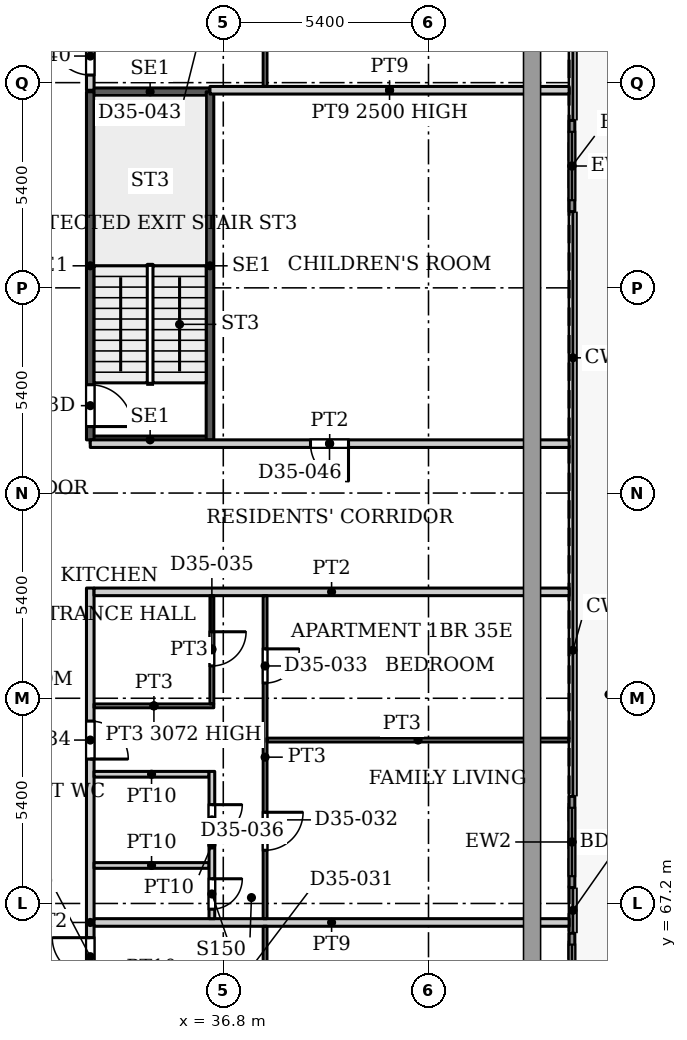
"""IFC4 building model, lengths in metres.
Left out: names, types, materials, properties, quantities, classifications, styles, units other than length and angle.
Written with IfcOpenShell. Run it as: python <this file> out.ifc"""

import sys

from ifc_helpers import new_model, si_unit, direction, frame, frame_2d, origin, place, context, subcontext, project, spatial, rectangle, extrude, source, transform, mapped, element, fill, save


model = new_model("IFC4")
c1 = context("Model", 3, precision=1e-05, world=origin(), true_north=direction((0.0, 1.0)))
c2 = subcontext(c1, "Body", "Model", "MODEL_VIEW")
j1 = project(units=[si_unit("LENGTHUNIT", "METRE"), si_unit("PLANEANGLEUNIT", "RADIAN")], contexts=[c1])
p1 = place(None, origin())
s1 = spatial("IfcSite", under=j1, at=p1, CompositionType="ELEMENT")
p2 = place(p1, origin())
s2 = spatial("IfcBuilding", under=s1, at=p2, CompositionType="ELEMENT")
p3 = place(p2, frame((0.0, 0.0, 152.6)))
s3 = spatial("IfcBuildingStorey", under=s2, at=p3, CompositionType="ELEMENT", Elevation=152.6)
p4 = place(p3, frame((45.975, 87.806, 0.0), z_axis=(0.0, 0.0, 1.0), x_axis=(0.0, -1.0, 0.0)))
e1 = element("IfcWall", 1, at=p4, inside=s3, PredefinedType="SOLIDWALL", context=c2, shape_type="SweptSolid", body=[
    extrude(rectangle(XDim=2.4, YDim=0.15, at=frame_2d((1.2, 0.0))), origin(), (0.0, 0.0, 1.0), 3.75),
])
p5 = place(p4, frame((0.3, 0.0, 0.0)))
e2 = element("IfcOpeningElement", 2, at=p5, cuts=e1, PredefinedType="OPENING", context=c2, shape_type="SweptSolid", body=[
    extrude(rectangle(XDim=1.8, YDim=2.4, at=frame_2d((0.9, 1.2))), frame((0.0, 0.085, 0.0), z_axis=(0.0, -1.0, 0.0), x_axis=(1.0, 0.0, 0.0)), (0.0, 0.0, 1.0), 0.17),
])
p6 = place(p3, frame((45.975, 70.018, 0.0), z_axis=(0.0, 0.0, 1.0), x_axis=(0.0, -1.0, 0.0)))
e3 = element("IfcWall", 3, at=p6, inside=s3, PredefinedType="SOLIDWALL", context=c2, shape_type="SweptSolid", body=[
    extrude(rectangle(XDim=2.4, YDim=0.15, at=frame_2d((1.2, 0.0))), origin(), (0.0, 0.0, 1.0), 3.75),
])
p7 = place(p6, frame((0.3, 0.0, 0.0)))
e4 = element("IfcOpeningElement", 4, at=p7, cuts=e3, PredefinedType="OPENING", context=c2, shape_type="SweptSolid", body=[
    extrude(rectangle(XDim=1.8, YDim=2.4, at=frame_2d((0.9, 1.2))), frame((0.0, 0.085, 0.0), z_axis=(0.0, -1.0, 0.0), x_axis=(1.0, 0.0, 0.0)), (0.0, 0.0, 1.0), 0.17),
])
p8 = place(p3, frame((45.975, 66.418, 0.0), z_axis=(0.0, 0.0, 1.0), x_axis=(0.0, -1.0, 0.0)))
e5 = element("IfcWall", 5, at=p8, inside=s3, PredefinedType="SOLIDWALL", context=c2, shape_type="SweptSolid", body=[
    extrude(rectangle(XDim=2.4, YDim=0.15, at=frame_2d((1.2, 0.0))), origin(), (0.0, 0.0, 1.0), 3.75),
])
p9 = place(p8, frame((0.3, 0.0, 0.0)))
e6 = element("IfcOpeningElement", 6, at=p9, cuts=e5, PredefinedType="OPENING", context=c2, shape_type="SweptSolid", body=[
    extrude(rectangle(XDim=1.8, YDim=2.4, at=frame_2d((0.9, 1.2))), frame((0.0, 0.085, 0.0), z_axis=(0.0, -1.0, 0.0), x_axis=(1.0, 0.0, 0.0)), (0.0, 0.0, 1.0), 0.17),
])
for number, where, z_axis, x_axis in (
    (7, (33.3, 79.4, 0.0), (0.0, 0.0, 1.0), (1.0, 0.0, 0.0)),
    (8, (33.3, 88.56, 0.0), (0.0, 0.0, 1.0), (1.0, 0.0, 0.0)),
):
    element("IfcWall", number, at=place(p3, frame(where, z_axis=z_axis, x_axis=x_axis)), inside=s3, PredefinedType="SHEAR", context=c2, shape_type="SweptSolid", body=[
        extrude(rectangle(XDim=3.15, YDim=0.2, at=frame_2d((1.575, 0.0))), origin(), (0.0, 0.0, 1.0), 3.9),
    ])
p10 = place(p3, frame((33.3, 79.4, 0.0), z_axis=(0.0, 0.0, 1.0), x_axis=(0.0, 1.0, 0.0)))
e9 = element("IfcWall", 9, at=p10, inside=s3, PredefinedType="SHEAR", context=c2, shape_type="SweptSolid", body=[
    extrude(rectangle(XDim=9.16, YDim=0.2, at=frame_2d((4.58, 0.0))), origin(), (0.0, 0.0, 1.0), 3.9),
])
p11 = place(p10, frame((0.35, 0.0, 0.0)))
e10 = element("IfcOpeningElement", 10, at=p11, cuts=e9, PredefinedType="OPENING", context=c2, shape_type="SweptSolid", body=[
    extrude(rectangle(XDim=1.1, YDim=2.2, at=frame_2d((0.55, 1.1))), frame((0.0, 0.11, 0.0), z_axis=(0.0, -1.0, 0.0), x_axis=(1.0, 0.0, 0.0)), (0.0, 0.0, 1.0), 0.22),
])
p12 = place(p3, frame((36.45, 79.4, 0.0), z_axis=(0.0, 0.0, 1.0), x_axis=(0.0, 1.0, 0.0)))
e11 = element("IfcWall", 11, at=p12, inside=s3, PredefinedType="SHEAR", context=c2, shape_type="SweptSolid", body=[
    extrude(rectangle(XDim=9.16, YDim=0.2, at=frame_2d((4.58, 0.0))), origin(), (0.0, 0.0, 1.0), 3.9),
])
p13 = place(p3, frame((33.3, 57.9, 0.0), z_axis=(0.0, 0.0, 1.0), x_axis=(0.0, 1.0, 0.0)))
e12 = element("IfcWall", 12, at=p13, inside=s3, PredefinedType="PARTITIONING", context=c2, shape_type="SweptSolid", body=[
    extrude(rectangle(XDim=17.6, YDim=0.2, at=frame_2d((8.8, 0.0))), origin(), (0.0, 0.0, 1.0), 3.6),
])
p14 = place(p13, frame((7.4, 0.0, 0.0)))
e13 = element("IfcOpeningElement", 13, at=p14, cuts=e12, PredefinedType="OPENING", context=c2, shape_type="SweptSolid", body=[
    extrude(rectangle(XDim=1.0, YDim=2.1, at=frame_2d((0.5, 1.05))), frame((0.0, 0.11, 0.0), z_axis=(0.0, -1.0, 0.0), x_axis=(1.0, 0.0, 0.0)), (0.0, 0.0, 1.0), 0.22),
])
p15 = place(p13, frame((13.1, 0.0, 0.0)))
e14 = element("IfcOpeningElement", 14, at=p15, cuts=e12, PredefinedType="OPENING", context=c2, shape_type="SweptSolid", body=[
    extrude(rectangle(XDim=1.0, YDim=2.1, at=frame_2d((0.5, 1.05))), frame((0.0, 0.11, 0.0), z_axis=(0.0, -1.0, 0.0), x_axis=(1.0, 0.0, 0.0)), (0.0, 0.0, 1.0), 0.22),
])
p16 = place(p3, frame((33.3, 79.3, 0.0), z_axis=(0.0, 0.0, 1.0), x_axis=(1.0, 0.0, 0.0)))
e15 = element("IfcWall", 15, at=p16, inside=s3, PredefinedType="PARTITIONING", context=c2, shape_type="SweptSolid", body=[
    extrude(rectangle(XDim=12.6, YDim=0.2, at=frame_2d((6.3, 0.0))), origin(), (0.0, 0.0, 1.0), 3.6),
])
p17 = place(p16, frame((5.795, 0.0, 0.0)))
e16 = element("IfcOpeningElement", 16, at=p17, cuts=e15, PredefinedType="OPENING", context=c2, shape_type="SweptSolid", body=[
    extrude(rectangle(XDim=1.0, YDim=2.1, at=frame_2d((0.5, 1.05))), frame((0.0, 0.11, 0.0), z_axis=(0.0, -1.0, 0.0), x_axis=(1.0, 0.0, 0.0)), (0.0, 0.0, 1.0), 0.22),
])
p18 = place(p3, frame((33.3, 88.6, 0.0), z_axis=(0.0, 0.0, 1.0), x_axis=(0.0, 1.0, 0.0)))
e17 = element("IfcWall", 17, at=p18, inside=s3, PredefinedType="PARTITIONING", context=c2, shape_type="SweptSolid", body=[
    extrude(rectangle(XDim=5.5, YDim=0.2, at=frame_2d((2.75, 0.0))), origin(), (0.0, 0.0, 1.0), 3.6),
])
p19 = place(p18, frame((0.4, 0.0, 0.0)))
e18 = element("IfcOpeningElement", 18, at=p19, cuts=e17, PredefinedType="OPENING", context=c2, shape_type="SweptSolid", body=[
    extrude(rectangle(XDim=1.0, YDim=2.1, at=frame_2d((0.5, 1.05))), frame((0.0, 0.11, 0.0), z_axis=(0.0, -1.0, 0.0), x_axis=(1.0, 0.0, 0.0)), (0.0, 0.0, 1.0), 0.22),
])
p20 = place(p3, frame((33.4, 66.7, 0.0), z_axis=(0.0, 0.0, 1.0), x_axis=(1.0, 0.0, 0.0)))
e19 = element("IfcWall", 19, at=p20, inside=s3, PredefinedType="PARTITIONING", context=c2, shape_type="SweptSolid", body=[
    extrude(rectangle(XDim=12.5, YDim=0.2, at=frame_2d((6.25, 0.0))), origin(), (0.0, 0.0, 1.0), 3.6),
])
for number, where, z_axis, x_axis in (
    (20, (33.4, 68.2, 0.0), (0.0, 0.0, 1.0), (1.0, 0.0, 0.0)),
    (21, (33.4, 70.6, 0.0), (0.0, 0.0, 1.0), (1.0, 0.0, 0.0)),
):
    element("IfcWall", number, at=place(p3, frame(where, z_axis=z_axis, x_axis=x_axis)), inside=s3, PredefinedType="PARTITIONING", context=c2, shape_type="SweptSolid", body=[
        extrude(rectangle(XDim=3.025, YDim=0.15, at=frame_2d((1.513, 0.0))), origin(), (0.0, 0.0, 1.0), 3.6),
    ])
p21 = place(p3, frame((33.4, 72.4, 0.0), z_axis=(0.0, 0.0, 1.0), x_axis=(1.0, 0.0, 0.0)))
e22 = element("IfcWall", 22, at=p21, inside=s3, PredefinedType="PARTITIONING", context=c2, shape_type="SweptSolid", body=[
    extrude(rectangle(XDim=3.15, YDim=0.1, at=frame_2d((1.575, 0.0))), origin(), (0.0, 0.0, 1.0), 3.072),
])
p22 = place(p3, frame((33.4, 75.4, 0.0), z_axis=(0.0, 0.0, 1.0), x_axis=(1.0, 0.0, 0.0)))
e23 = element("IfcWall", 23, at=p22, inside=s3, PredefinedType="PARTITIONING", context=c2, shape_type="SweptSolid", body=[
    extrude(rectangle(XDim=12.5, YDim=0.2, at=frame_2d((6.25, 0.0))), origin(), (0.0, 0.0, 1.0), 3.6),
])
p23 = place(p3, frame((36.5, 66.8, 0.0), z_axis=(0.0, 0.0, 1.0), x_axis=(0.0, 1.0, 0.0)))
e24 = element("IfcWall", 24, at=p23, inside=s3, PredefinedType="PARTITIONING", context=c2, shape_type="SweptSolid", body=[
    extrude(rectangle(XDim=3.875, YDim=0.15, at=frame_2d((1.938, 0.0))), origin(), (0.0, 0.0, 1.0), 3.6),
])
p24 = place(p23, frame((2.2, 0.0, 0.0)))
e25 = element("IfcOpeningElement", 25, at=p24, cuts=e24, PredefinedType="OPENING", context=c2, shape_type="SweptSolid", body=[
    extrude(rectangle(XDim=0.8, YDim=2.1, at=frame_2d((0.4, 1.05))), frame((0.0, 0.085, 0.0), z_axis=(0.0, -1.0, 0.0), x_axis=(1.0, 0.0, 0.0)), (0.0, 0.0, 1.0), 0.17),
])
p25 = place(p23, frame((0.25, 0.0, 0.0)))
e26 = element("IfcOpeningElement", 26, at=p25, cuts=e24, PredefinedType="OPENING", context=c2, shape_type="SweptSolid", body=[
    extrude(rectangle(XDim=0.8, YDim=2.1, at=frame_2d((0.4, 1.05))), frame((0.0, 0.085, 0.0), z_axis=(0.0, -1.0, 0.0), x_axis=(1.0, 0.0, 0.0)), (0.0, 0.0, 1.0), 0.17),
])
p26 = place(p3, frame((36.5, 72.45, 0.0), z_axis=(0.0, 0.0, 1.0), x_axis=(0.0, 1.0, 0.0)))
e27 = element("IfcWall", 27, at=p26, inside=s3, PredefinedType="PARTITIONING", context=c2, shape_type="SweptSolid", body=[
    extrude(rectangle(XDim=2.85, YDim=0.1, at=frame_2d((1.425, 0.0))), origin(), (0.0, 0.0, 1.0), 3.6),
])
p27 = place(p26, frame((1.0, 0.0, 0.0)))
e28 = element("IfcOpeningElement", 28, at=p27, cuts=e27, PredefinedType="OPENING", context=c2, shape_type="SweptSolid", body=[
    extrude(rectangle(XDim=0.9, YDim=2.1, at=frame_2d((0.45, 1.05))), frame((0.0, 0.06, 0.0), z_axis=(0.0, -1.0, 0.0), x_axis=(1.0, 0.0, 0.0)), (0.0, 0.0, 1.0), 0.12),
])
p28 = place(p3, frame((36.45, 88.6, 0.0), z_axis=(0.0, 0.0, 1.0), x_axis=(1.0, 0.0, 0.0)))
e29 = element("IfcWall", 29, at=p28, inside=s3, PredefinedType="PARTITIONING", context=c2, shape_type="SweptSolid", body=[
    extrude(rectangle(XDim=9.45, YDim=0.2, at=frame_2d((4.725, 0.0))), origin(), (0.0, 0.0, 1.0), 2.5),
])
p29 = place(p3, frame((37.9, 58.1, 0.0), z_axis=(0.0, 0.0, 1.0), x_axis=(0.0, 1.0, 0.0)))
e30 = element("IfcWall", 30, at=p29, inside=s3, PredefinedType="PARTITIONING", context=c2, shape_type="SweptSolid", body=[
    extrude(rectangle(XDim=8.5, YDim=0.1, at=frame_2d((4.25, 0.0))), origin(), (0.0, 0.0, 1.0), 3.6),
])
p30 = place(p29, frame((1.1, 0.0, 0.0)))
e31 = element("IfcOpeningElement", 31, at=p30, cuts=e30, PredefinedType="OPENING", context=c2, shape_type="SweptSolid", body=[
    extrude(rectangle(XDim=0.9, YDim=2.1, at=frame_2d((0.45, 1.05))), frame((0.0, 0.06, 0.0), z_axis=(0.0, -1.0, 0.0), x_axis=(1.0, 0.0, 0.0)), (0.0, 0.0, 1.0), 0.12),
])
p31 = place(p29, frame((5.4, 0.0, 0.0)))
e32 = element("IfcOpeningElement", 32, at=p31, cuts=e30, PredefinedType="OPENING", context=c2, shape_type="SweptSolid", body=[
    extrude(rectangle(XDim=1.0, YDim=2.1, at=frame_2d((0.5, 1.05))), frame((0.0, 0.06, 0.0), z_axis=(0.0, -1.0, 0.0), x_axis=(1.0, 0.0, 0.0)), (0.0, 0.0, 1.0), 0.12),
])
p32 = place(p3, frame((37.9, 66.8, 0.0), z_axis=(0.0, 0.0, 1.0), x_axis=(0.0, 1.0, 0.0)))
e33 = element("IfcWall", 33, at=p32, inside=s3, PredefinedType="PARTITIONING", context=c2, shape_type="SweptSolid", body=[
    extrude(rectangle(XDim=8.5, YDim=0.1, at=frame_2d((4.25, 0.0))), origin(), (0.0, 0.0, 1.0), 3.6),
])
p33 = place(p32, frame((6.2, 0.0, 0.0)))
e34 = element("IfcOpeningElement", 34, at=p33, cuts=e33, PredefinedType="OPENING", context=c2, shape_type="SweptSolid", body=[
    extrude(rectangle(XDim=0.9, YDim=2.1, at=frame_2d((0.45, 1.05))), frame((0.0, 0.06, 0.0), z_axis=(0.0, -1.0, 0.0), x_axis=(1.0, 0.0, 0.0)), (0.0, 0.0, 1.0), 0.12),
])
p34 = place(p32, frame((1.8, 0.0, 0.0)))
e35 = element("IfcOpeningElement", 35, at=p34, cuts=e33, PredefinedType="OPENING", context=c2, shape_type="SweptSolid", body=[
    extrude(rectangle(XDim=1.0, YDim=2.1, at=frame_2d((0.5, 1.05))), frame((0.0, 0.06, 0.0), z_axis=(0.0, -1.0, 0.0), x_axis=(1.0, 0.0, 0.0)), (0.0, 0.0, 1.0), 0.12),
])
p35 = place(p3, frame((37.9, 88.7, 0.0), z_axis=(0.0, 0.0, 1.0), x_axis=(0.0, 1.0, 0.0)))
e36 = element("IfcWall", 36, at=p35, inside=s3, PredefinedType="PARTITIONING", context=c2, shape_type="SweptSolid", body=[
    extrude(rectangle(XDim=9.2, YDim=0.1, at=frame_2d((4.6, 0.0))), origin(), (0.0, 0.0, 1.0), 3.6),
])
p36 = place(p35, frame((6.8, 0.0, 0.0)))
e37 = element("IfcOpeningElement", 37, at=p36, cuts=e36, PredefinedType="OPENING", context=c2, shape_type="SweptSolid", body=[
    extrude(rectangle(XDim=0.9, YDim=2.1, at=frame_2d((0.45, 1.05))), frame((0.0, 0.06, 0.0), z_axis=(0.0, -1.0, 0.0), x_axis=(1.0, 0.0, 0.0)), (0.0, 0.0, 1.0), 0.12),
])
p37 = place(p35, frame((2.1, 0.0, 0.0)))
e38 = element("IfcOpeningElement", 38, at=p37, cuts=e36, PredefinedType="OPENING", context=c2, shape_type="SweptSolid", body=[
    extrude(rectangle(XDim=1.0, YDim=2.1, at=frame_2d((0.5, 1.05))), frame((0.0, 0.06, 0.0), z_axis=(0.0, -1.0, 0.0), x_axis=(1.0, 0.0, 0.0)), (0.0, 0.0, 1.0), 0.12),
])
p38 = place(p3, frame((37.95, 71.5, 0.0), z_axis=(0.0, 0.0, 1.0), x_axis=(1.0, 0.0, 0.0)))
e39 = element("IfcWall", 39, at=p38, inside=s3, PredefinedType="PARTITIONING", context=c2, shape_type="SweptSolid", body=[
    extrude(rectangle(XDim=7.95, YDim=0.1, at=frame_2d((3.975, 0.0))), origin(), (0.0, 0.0, 1.0), 3.6),
])
m1 = source(origin(), c2, "Body", "SweptSolid", [
    extrude(rectangle(XDim=1.8, YDim=2.4, at=frame_2d((0.9, 1.2))), frame((0.0, 0.025, 0.0), z_axis=(0.0, -1.0, 0.0), x_axis=(1.0, 0.0, 0.0)), (0.0, 0.0, 1.0), 0.05),
])
p39 = place(p5, origin())
e40 = element("IfcDoor", 40, at=p39, inside=s3, OperationType="SLIDING_TO_LEFT", PredefinedType="DOOR", context=c2, shape_type="MappedRepresentation", body=[
    mapped(m1, transform((0.0, 0.0, 0.0), x_axis=(1.0, 0.0, 0.0), y_axis=(0.0, 1.0, 0.0), z_axis=(0.0, 0.0, 1.0), scale=1.0)),
])
fill(e2, e40)
p40 = place(p7, origin())
e41 = element("IfcDoor", 41, at=p40, inside=s3, OperationType="SLIDING_TO_LEFT", PredefinedType="DOOR", context=c2, shape_type="MappedRepresentation", body=[
    mapped(m1, transform((0.0, 0.0, 0.0), x_axis=(1.0, 0.0, 0.0), y_axis=(0.0, 1.0, 0.0), z_axis=(0.0, 0.0, 1.0), scale=1.0)),
])
fill(e4, e41)
p41 = place(p9, origin())
e42 = element("IfcDoor", 42, at=p41, inside=s3, OperationType="SLIDING_TO_LEFT", PredefinedType="DOOR", context=c2, shape_type="MappedRepresentation", body=[
    mapped(m1, transform((0.0, 0.0, 0.0), x_axis=(1.0, 0.0, 0.0), y_axis=(0.0, 1.0, 0.0), z_axis=(0.0, 0.0, 1.0), scale=1.0)),
])
fill(e6, e42)
m2 = source(origin(), c2, "Body", "SweptSolid", [
    extrude(rectangle(XDim=1.1, YDim=2.2, at=frame_2d((0.55, 1.1))), frame((0.0, 0.025, 0.0), z_axis=(0.0, -1.0, 0.0), x_axis=(1.0, 0.0, 0.0)), (0.0, 0.0, 1.0), 0.05),
])
p42 = place(p11, origin())
e43 = element("IfcDoor", 43, at=p42, inside=s3, OperationType="SINGLE_SWING_RIGHT", PredefinedType="DOOR", context=c2, shape_type="MappedRepresentation", body=[
    mapped(m2, transform((0.0, 0.0, 0.0), x_axis=(1.0, 0.0, 0.0), y_axis=(0.0, 1.0, 0.0), z_axis=(0.0, 0.0, 1.0), scale=1.0)),
])
fill(e10, e43)
m3 = source(origin(), c2, "Body", "SweptSolid", [
    extrude(rectangle(XDim=1.0, YDim=2.1, at=frame_2d((0.5, 1.05))), frame((0.0, 0.025, 0.0), z_axis=(0.0, -1.0, 0.0), x_axis=(1.0, 0.0, 0.0)), (0.0, 0.0, 1.0), 0.05),
])
p43 = place(p14, origin())
e44 = element("IfcDoor", 44, at=p43, inside=s3, OperationType="SINGLE_SWING_LEFT", PredefinedType="DOOR", context=c2, shape_type="MappedRepresentation", body=[
    mapped(m3, transform((0.0, 0.0, 0.0), x_axis=(1.0, 0.0, 0.0), y_axis=(0.0, 1.0, 0.0), z_axis=(0.0, 0.0, 1.0), scale=1.0)),
])
fill(e13, e44)
m4 = source(origin(), c2, "Body", "SweptSolid", [
    extrude(rectangle(XDim=0.8, YDim=2.1, at=frame_2d((0.4, 1.05))), frame((0.0, 0.025, 0.0), z_axis=(0.0, -1.0, 0.0), x_axis=(1.0, 0.0, 0.0)), (0.0, 0.0, 1.0), 0.05),
])
p44 = place(p24, origin())
e45 = element("IfcDoor", 45, at=p44, inside=s3, OperationType="SINGLE_SWING_RIGHT", PredefinedType="DOOR", context=c2, shape_type="MappedRepresentation", body=[
    mapped(m4, transform((0.0, 0.0, 0.0), x_axis=(1.0, 0.0, 0.0), y_axis=(0.0, 1.0, 0.0), z_axis=(0.0, 0.0, 1.0), scale=1.0)),
])
fill(e25, e45)
m5 = source(origin(), c2, "Body", "SweptSolid", [
    extrude(rectangle(XDim=0.9, YDim=2.1, at=frame_2d((0.45, 1.05))), frame((0.0, 0.025, 0.0), z_axis=(0.0, -1.0, 0.0), x_axis=(1.0, 0.0, 0.0)), (0.0, 0.0, 1.0), 0.05),
])
p45 = place(p33, origin())
e46 = element("IfcDoor", 46, at=p45, inside=s3, OperationType="SINGLE_SWING_RIGHT", PredefinedType="DOOR", context=c2, shape_type="MappedRepresentation", body=[
    mapped(m5, transform((0.0, 0.0, 0.0), x_axis=(1.0, 0.0, 0.0), y_axis=(0.0, 1.0, 0.0), z_axis=(0.0, 0.0, 1.0), scale=1.0)),
])
fill(e34, e46)
p46 = place(p15, origin())
e47 = element("IfcDoor", 47, at=p46, inside=s3, OperationType="SINGLE_SWING_RIGHT", PredefinedType="DOOR", context=c2, shape_type="MappedRepresentation", body=[
    mapped(m3, transform((0.0, 0.0, 0.0), x_axis=(1.0, 0.0, 0.0), y_axis=(0.0, 1.0, 0.0), z_axis=(0.0, 0.0, 1.0), scale=1.0)),
])
fill(e14, e47)
p47 = place(p27, origin())
e48 = element("IfcDoor", 48, at=p47, inside=s3, OperationType="SINGLE_SWING_RIGHT", PredefinedType="DOOR", context=c2, shape_type="MappedRepresentation", body=[
    mapped(m5, transform((0.0, 0.0, 0.0), x_axis=(1.0, 0.0, 0.0), y_axis=(0.0, 1.0, 0.0), z_axis=(0.0, 0.0, 1.0), scale=1.0)),
])
fill(e28, e48)
m6 = source(origin(), c2, "Body", "SweptSolid", [
    extrude(rectangle(XDim=1.0, YDim=2.1, at=frame_2d((0.5, 1.05))), frame((0.0, 0.025, 0.0), z_axis=(0.0, -1.0, 0.0), x_axis=(1.0, 0.0, 0.0)), (0.0, 0.0, 1.0), 0.05),
])
p48 = place(p34, origin())
e49 = element("IfcDoor", 49, at=p48, inside=s3, OperationType="SINGLE_SWING_RIGHT", PredefinedType="DOOR", context=c2, shape_type="MappedRepresentation", body=[
    mapped(m6, transform((0.0, 0.0, 0.0), x_axis=(1.0, 0.0, 0.0), y_axis=(0.0, 1.0, 0.0), z_axis=(0.0, 0.0, 1.0), scale=1.0)),
])
fill(e35, e49)
p49 = place(p25, origin())
e50 = element("IfcDoor", 50, at=p49, inside=s3, OperationType="SINGLE_SWING_RIGHT", PredefinedType="DOOR", context=c2, shape_type="MappedRepresentation", body=[
    mapped(m4, transform((0.0, 0.0, 0.0), x_axis=(1.0, 0.0, 0.0), y_axis=(0.0, 1.0, 0.0), z_axis=(0.0, 0.0, 1.0), scale=1.0)),
])
fill(e26, e50)
p50 = place(p19, origin())
e51 = element("IfcDoor", 51, at=p50, inside=s3, OperationType="SINGLE_SWING_LEFT", PredefinedType="DOOR", context=c2, shape_type="MappedRepresentation", body=[
    mapped(m3, transform((0.0, 0.0, 0.0), x_axis=(1.0, 0.0, 0.0), y_axis=(0.0, 1.0, 0.0), z_axis=(0.0, 0.0, 1.0), scale=1.0)),
])
fill(e18, e51)
m7 = source(origin(), c2, "Body", "SweptSolid", [
    extrude(rectangle(XDim=1.0, YDim=2.1, at=frame_2d((0.5, 1.05))), frame((0.0, 0.025, 0.0), z_axis=(0.0, -1.0, 0.0), x_axis=(1.0, 0.0, 0.0)), (0.0, 0.0, 1.0), 0.05),
])
p51 = place(p17, origin())
e52 = element("IfcDoor", 52, at=p51, inside=s3, OperationType="SINGLE_SWING_RIGHT", PredefinedType="DOOR", context=c2, shape_type="MappedRepresentation", body=[
    mapped(m7, transform((0.0, 0.0, 0.0), x_axis=(1.0, 0.0, 0.0), y_axis=(0.0, 1.0, 0.0), z_axis=(0.0, 0.0, 1.0), scale=1.0)),
])
fill(e16, e52)
save(model, sys.argv[1])
